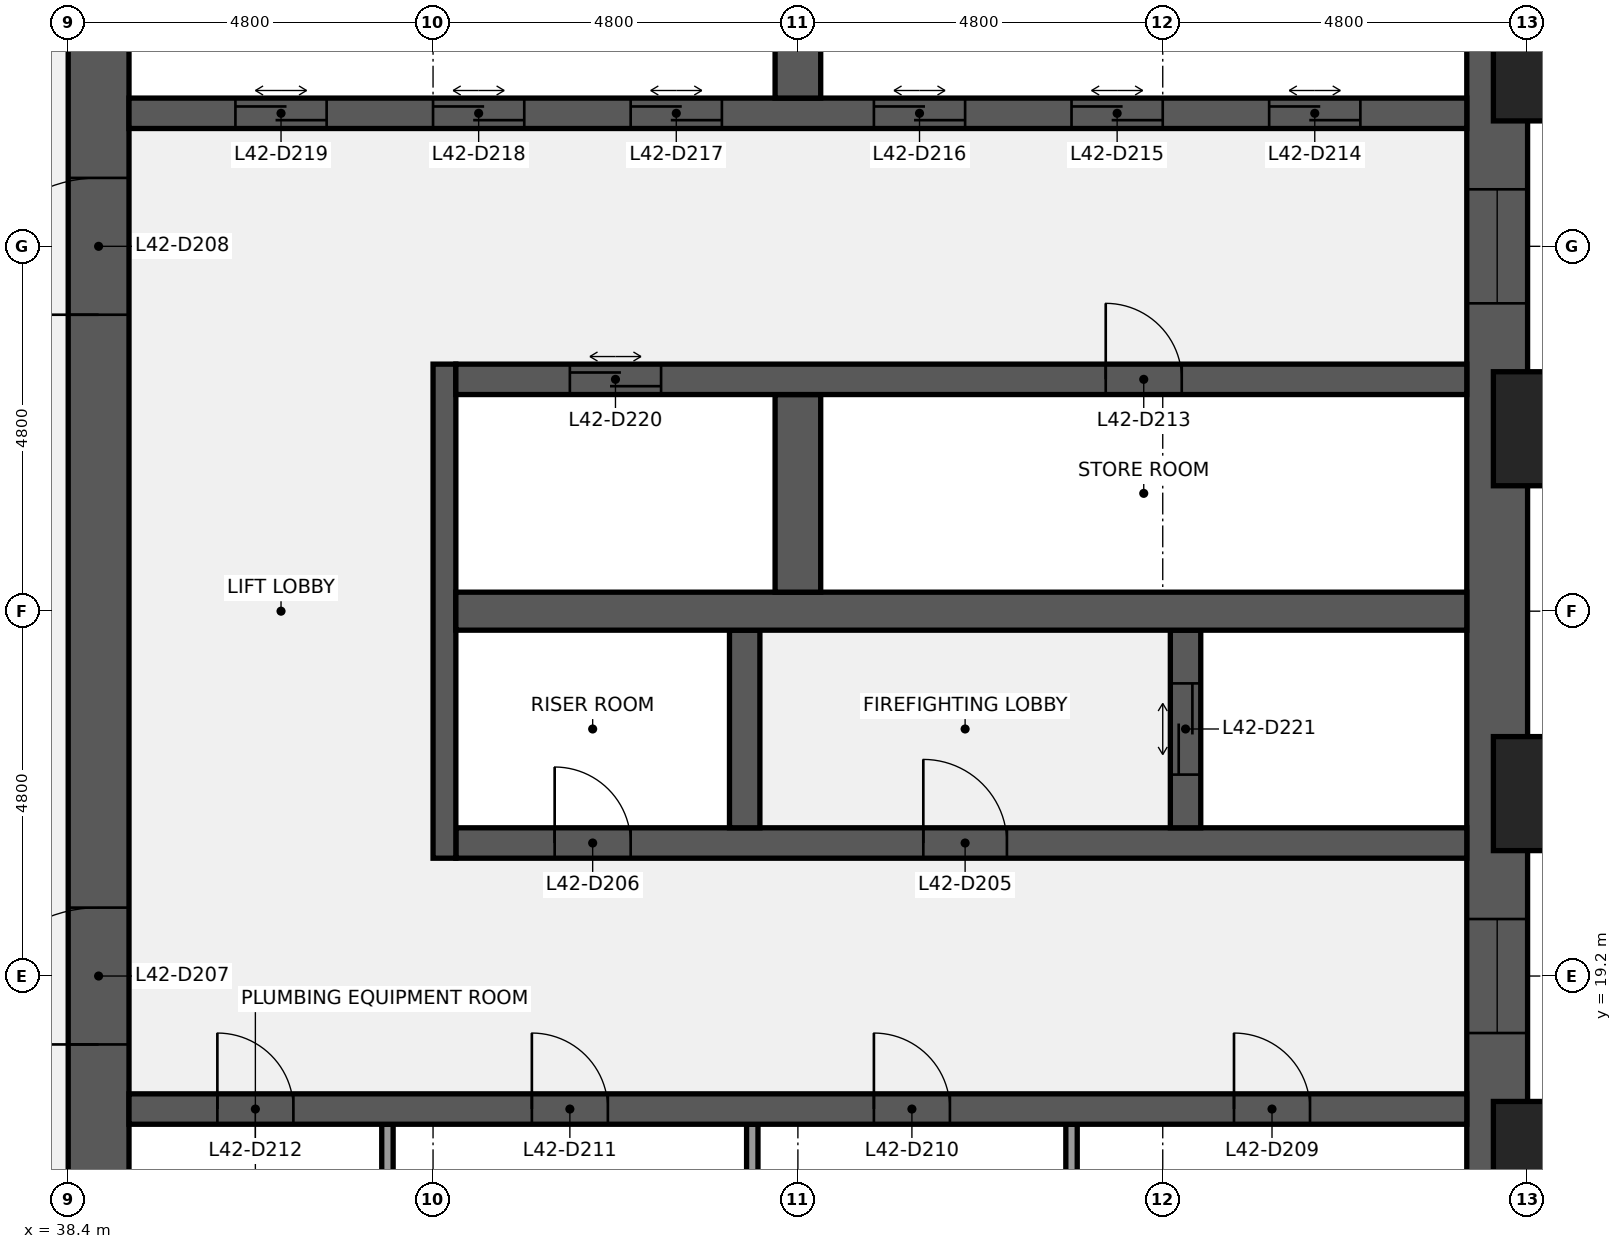
"""IFC4 building model, lengths in metres.
Left out: names, types, materials, properties, quantities, classifications, styles, units other than length and angle.
Written with IfcOpenShell. Run it as: python <this file> out.ifc"""

import sys

from ifc_helpers import new_model, si_unit, direction, frame, frame_2d, origin, origin_2d, place, context, subcontext, project, spatial, rectangle, extrude, element, fill, save


model = new_model("IFC4")
c1 = context("Model", 3, precision=1e-05, world=origin(), true_north=direction((0.0, 1.0)))
c2 = subcontext(c1, "Body", "Model", "MODEL_VIEW")
j1 = project(units=[si_unit("LENGTHUNIT", "METRE"), si_unit("PLANEANGLEUNIT", "RADIAN")], contexts=[c1])
p1 = place(None, origin())
s1 = spatial("IfcSite", under=j1, at=p1, CompositionType="ELEMENT")
p2 = place(p1, origin())
s2 = spatial("IfcBuilding", under=s1, at=p2, CompositionType="ELEMENT")
p3 = place(p2, frame((0.0, 0.0, 197.2)))
s3 = spatial("IfcBuildingStorey", under=s2, at=p3, CompositionType="ELEMENT", Elevation=197.2)
p4 = place(p3, frame((57.2, 38.4, 0.0), z_axis=(0.0, 0.0, 1.0), x_axis=(0.0, -1.0, 0.0)))
e1 = element("IfcWall", 1, at=p4, inside=s3, PredefinedType="SHEAR", context=c2, shape_type="SweptSolid", body=[
    extrude(rectangle(XDim=28.8, YDim=0.8, at=frame_2d((14.4, 0.0))), origin(), (0.0, 0.0, 1.0), 3.84),
])
p5 = place(p4, frame((18.45, 0.0, 0.9)))
e2 = element("IfcOpeningElement", 2, at=p5, cuts=e1, PredefinedType="OPENING", context=c2, shape_type="SweptSolid", body=[
    extrude(rectangle(XDim=1.5, YDim=1.5, at=frame_2d((0.75, 0.75))), frame((0.0, 0.41, 0.0), z_axis=(0.0, -1.0, 0.0), x_axis=(1.0, 0.0, 0.0)), (0.0, 0.0, 1.0), 0.82),
])
p6 = place(p4, frame((8.85, 0.0, 0.9)))
e3 = element("IfcOpeningElement", 3, at=p6, cuts=e1, PredefinedType="OPENING", context=c2, shape_type="SweptSolid", body=[
    extrude(rectangle(XDim=1.5, YDim=1.5, at=frame_2d((0.75, 0.75))), frame((0.0, 0.41, 0.0), z_axis=(0.0, -1.0, 0.0), x_axis=(1.0, 0.0, 0.0)), (0.0, 0.0, 1.0), 0.82),
])
p7 = place(p3, frame((38.8, 9.6, 0.0), z_axis=(0.0, 0.0, 1.0), x_axis=(0.0, 1.0, 0.0)))
e4 = element("IfcWall", 4, at=p7, inside=s3, PredefinedType="SHEAR", context=c2, shape_type="SweptSolid", body=[
    extrude(rectangle(XDim=28.8, YDim=0.8, at=frame_2d((14.4, 0.0))), origin(), (0.0, 0.0, 1.0), 3.84),
])
p8 = place(p7, frame((8.7, 0.0, 0.0)))
e5 = element("IfcOpeningElement", 5, at=p8, cuts=e4, PredefinedType="OPENING", context=c2, shape_type="SweptSolid", body=[
    extrude(rectangle(XDim=1.8, YDim=2.1, at=frame_2d((0.9, 1.05))), frame((0.0, 0.41, 0.0), z_axis=(0.0, -1.0, 0.0), x_axis=(1.0, 0.0, 0.0)), (0.0, 0.0, 1.0), 0.82),
])
p9 = place(p7, frame((18.3, 0.0, 0.0)))
e6 = element("IfcOpeningElement", 6, at=p9, cuts=e4, PredefinedType="OPENING", context=c2, shape_type="SweptSolid", body=[
    extrude(rectangle(XDim=1.8, YDim=2.1, at=frame_2d((0.9, 1.05))), frame((0.0, 0.41, 0.0), z_axis=(0.0, -1.0, 0.0), x_axis=(1.0, 0.0, 0.0)), (0.0, 0.0, 1.0), 0.82),
])
for number, where, z_axis, x_axis in (
    (7, (51.6, 14.65, 0.0), (0.0, 0.0, 1.0), (0.0, 1.0, 0.0)),
    (8, (47.4, 14.65, 0.0), (0.0, 0.0, 1.0), (0.0, 1.0, 0.0)),
    (9, (42.6, 14.65, 0.0), (0.0, 0.0, 1.0), (0.0, 1.0, 0.0)),
):
    element("IfcWall", number, at=place(p3, frame(where, z_axis=z_axis, x_axis=x_axis)), inside=s3, PredefinedType="PARTITIONING", context=c2, shape_type="SweptSolid", body=[
        extrude(rectangle(XDim=2.6, YDim=0.15, at=frame_2d((1.3, 0.0))), origin(), (0.0, 0.0, 1.0), 3.84),
    ])
p10 = place(p3, frame((39.2, 17.45, 0.0), z_axis=(0.0, 0.0, 1.0), x_axis=(1.0, 0.0, 0.0)))
e10 = element("IfcWall", 10, at=p10, inside=s3, PredefinedType="SHEAR", context=c2, shape_type="SweptSolid", body=[
    extrude(rectangle(XDim=17.6, YDim=0.4, at=frame_2d((8.8, 0.0))), origin(), (0.0, 0.0, 1.0), 3.84),
])
p11 = place(p10, frame((14.538, 0.0, 0.0)))
e11 = element("IfcOpeningElement", 11, at=p11, cuts=e10, PredefinedType="OPENING", context=c2, shape_type="SweptSolid", body=[
    extrude(rectangle(XDim=1.0, YDim=2.1, at=frame_2d((0.5, 1.05))), frame((0.0, 0.21, 0.0), z_axis=(0.0, -1.0, 0.0), x_axis=(1.0, 0.0, 0.0)), (0.0, 0.0, 1.0), 0.42),
])
p12 = place(p10, frame((9.8, 0.0, 0.0)))
e12 = element("IfcOpeningElement", 12, at=p12, cuts=e10, PredefinedType="OPENING", context=c2, shape_type="SweptSolid", body=[
    extrude(rectangle(XDim=1.0, YDim=2.1, at=frame_2d((0.5, 1.05))), frame((0.0, 0.21, 0.0), z_axis=(0.0, -1.0, 0.0), x_axis=(1.0, 0.0, 0.0)), (0.0, 0.0, 1.0), 0.42),
])
p13 = place(p10, frame((5.3, 0.0, 0.0)))
e13 = element("IfcOpeningElement", 13, at=p13, cuts=e10, PredefinedType="OPENING", context=c2, shape_type="SweptSolid", body=[
    extrude(rectangle(XDim=1.0, YDim=2.1, at=frame_2d((0.5, 1.05))), frame((0.0, 0.21, 0.0), z_axis=(0.0, -1.0, 0.0), x_axis=(1.0, 0.0, 0.0)), (0.0, 0.0, 1.0), 0.42),
])
p14 = place(p10, frame((1.163, 0.0, 0.0)))
e14 = element("IfcOpeningElement", 14, at=p14, cuts=e10, PredefinedType="OPENING", context=c2, shape_type="SweptSolid", body=[
    extrude(rectangle(XDim=1.0, YDim=2.1, at=frame_2d((0.5, 1.05))), frame((0.0, 0.21, 0.0), z_axis=(0.0, -1.0, 0.0), x_axis=(1.0, 0.0, 0.0)), (0.0, 0.0, 1.0), 0.42),
])
p15 = place(p3, frame((43.5, 20.95, 0.0), z_axis=(0.0, 0.0, 1.0), x_axis=(1.0, 0.0, 0.0)))
e15 = element("IfcWall", 15, at=p15, inside=s3, PredefinedType="SHEAR", context=c2, shape_type="SweptSolid", body=[
    extrude(rectangle(XDim=13.3, YDim=0.4, at=frame_2d((6.65, 0.0))), origin(), (0.0, 0.0, 1.0), 3.84),
])
p16 = place(p15, frame((6.15, 0.0, 0.0)))
e16 = element("IfcOpeningElement", 16, at=p16, cuts=e15, PredefinedType="OPENING", context=c2, shape_type="SweptSolid", body=[
    extrude(rectangle(XDim=1.1, YDim=2.1, at=frame_2d((0.55, 1.05))), frame((0.0, 0.21, 0.0), z_axis=(0.0, -1.0, 0.0), x_axis=(1.0, 0.0, 0.0)), (0.0, 0.0, 1.0), 0.42),
])
p17 = place(p15, frame((1.3, 0.0, 0.0)))
e17 = element("IfcOpeningElement", 17, at=p17, cuts=e15, PredefinedType="OPENING", context=c2, shape_type="SweptSolid", body=[
    extrude(rectangle(XDim=1.0, YDim=2.1, at=frame_2d((0.5, 1.05))), frame((0.0, 0.21, 0.0), z_axis=(0.0, -1.0, 0.0), x_axis=(1.0, 0.0, 0.0)), (0.0, 0.0, 1.0), 0.42),
])
p18 = place(p3, frame((43.35, 20.75, 0.0), z_axis=(0.0, 0.0, 1.0), x_axis=(0.0, 1.0, 0.0)))
e18 = element("IfcWall", 18, at=p18, inside=s3, PredefinedType="SHEAR", context=c2, shape_type="SweptSolid", body=[
    extrude(rectangle(XDim=6.5, YDim=0.3, at=frame_2d((3.25, 0.0))), origin(), (0.0, 0.0, 1.0), 3.84),
])
p19 = place(p3, frame((53.1, 21.15, 0.0), z_axis=(0.0, 0.0, 1.0), x_axis=(0.0, 1.0, 0.0)))
e19 = element("IfcWall", 19, at=p19, inside=s3, PredefinedType="SHEAR", context=c2, shape_type="SweptSolid", body=[
    extrude(rectangle(XDim=2.6, YDim=0.4, at=frame_2d((1.3, 0.0))), origin(), (0.0, 0.0, 1.0), 3.84),
])
p20 = place(p19, frame((0.7, 0.0, 0.0)))
e20 = element("IfcOpeningElement", 20, at=p20, cuts=e19, PredefinedType="OPENING", context=c2, shape_type="SweptSolid", body=[
    extrude(rectangle(XDim=1.2, YDim=2.1, at=frame_2d((0.6, 1.05))), frame((0.0, 0.21, 0.0), z_axis=(0.0, -1.0, 0.0), x_axis=(1.0, 0.0, 0.0)), (0.0, 0.0, 1.0), 0.42),
])
p21 = place(p3, frame((47.3, 21.15, 0.0), z_axis=(0.0, 0.0, 1.0), x_axis=(0.0, 1.0, 0.0)))
e21 = element("IfcWall", 21, at=p21, inside=s3, PredefinedType="SHEAR", context=c2, shape_type="SweptSolid", body=[
    extrude(rectangle(XDim=2.6, YDim=0.4, at=frame_2d((1.3, 0.0))), origin(), (0.0, 0.0, 1.0), 3.84),
])
p22 = place(p3, frame((43.5, 24.0, 0.0), z_axis=(0.0, 0.0, 1.0), x_axis=(1.0, 0.0, 0.0)))
e22 = element("IfcWall", 22, at=p22, inside=s3, PredefinedType="SHEAR", context=c2, shape_type="SweptSolid", body=[
    extrude(rectangle(XDim=13.3, YDim=0.5, at=frame_2d((6.65, 0.0))), origin(), (0.0, 0.0, 1.0), 3.84),
])
p23 = place(p3, frame((48.0, 24.25, 0.0), z_axis=(0.0, 0.0, 1.0), x_axis=(0.0, 1.0, 0.0)))
e23 = element("IfcWall", 23, at=p23, inside=s3, PredefinedType="SHEAR", context=c2, shape_type="SweptSolid", body=[
    extrude(rectangle(XDim=2.6, YDim=0.6, at=frame_2d((1.3, 0.0))), origin(), (0.0, 0.0, 1.0), 3.84),
])
p24 = place(p3, frame((43.5, 27.05, 0.0), z_axis=(0.0, 0.0, 1.0), x_axis=(1.0, 0.0, 0.0)))
e24 = element("IfcWall", 24, at=p24, inside=s3, PredefinedType="SHEAR", context=c2, shape_type="SweptSolid", body=[
    extrude(rectangle(XDim=13.3, YDim=0.4, at=frame_2d((6.65, 0.0))), origin(), (0.0, 0.0, 1.0), 3.84),
])
p25 = place(p24, frame((8.55, 0.0, 0.0)))
e25 = element("IfcOpeningElement", 25, at=p25, cuts=e24, PredefinedType="OPENING", context=c2, shape_type="SweptSolid", body=[
    extrude(rectangle(XDim=1.0, YDim=2.1, at=frame_2d((0.5, 1.05))), frame((0.0, 0.21, 0.0), z_axis=(0.0, -1.0, 0.0), x_axis=(1.0, 0.0, 0.0)), (0.0, 0.0, 1.0), 0.42),
])
p26 = place(p24, frame((1.5, 0.0, 0.0)))
e26 = element("IfcOpeningElement", 26, at=p26, cuts=e24, PredefinedType="OPENING", context=c2, shape_type="SweptSolid", body=[
    extrude(rectangle(XDim=1.2, YDim=2.1, at=frame_2d((0.6, 1.05))), frame((0.0, 0.21, 0.0), z_axis=(0.0, -1.0, 0.0), x_axis=(1.0, 0.0, 0.0)), (0.0, 0.0, 1.0), 0.42),
])
p27 = place(p3, frame((39.2, 30.55, 0.0), z_axis=(0.0, 0.0, 1.0), x_axis=(1.0, 0.0, 0.0)))
e27 = element("IfcWall", 27, at=p27, inside=s3, PredefinedType="SHEAR", context=c2, shape_type="SweptSolid", body=[
    extrude(rectangle(XDim=17.6, YDim=0.4, at=frame_2d((8.8, 0.0))), origin(), (0.0, 0.0, 1.0), 3.84),
])
p28 = place(p27, frame((15.0, 0.0, 0.0)))
e28 = element("IfcOpeningElement", 28, at=p28, cuts=e27, PredefinedType="OPENING", context=c2, shape_type="SweptSolid", body=[
    extrude(rectangle(XDim=1.2, YDim=2.1, at=frame_2d((0.6, 1.05))), frame((0.0, 0.21, 0.0), z_axis=(0.0, -1.0, 0.0), x_axis=(1.0, 0.0, 0.0)), (0.0, 0.0, 1.0), 0.42),
])
p29 = place(p27, frame((12.4, 0.0, 0.0)))
e29 = element("IfcOpeningElement", 29, at=p29, cuts=e27, PredefinedType="OPENING", context=c2, shape_type="SweptSolid", body=[
    extrude(rectangle(XDim=1.2, YDim=2.1, at=frame_2d((0.6, 1.05))), frame((0.0, 0.21, 0.0), z_axis=(0.0, -1.0, 0.0), x_axis=(1.0, 0.0, 0.0)), (0.0, 0.0, 1.0), 0.42),
])
p30 = place(p27, frame((9.8, 0.0, 0.0)))
e30 = element("IfcOpeningElement", 30, at=p30, cuts=e27, PredefinedType="OPENING", context=c2, shape_type="SweptSolid", body=[
    extrude(rectangle(XDim=1.2, YDim=2.1, at=frame_2d((0.6, 1.05))), frame((0.0, 0.21, 0.0), z_axis=(0.0, -1.0, 0.0), x_axis=(1.0, 0.0, 0.0)), (0.0, 0.0, 1.0), 0.42),
])
p31 = place(p27, frame((6.6, 0.0, 0.0)))
e31 = element("IfcOpeningElement", 31, at=p31, cuts=e27, PredefinedType="OPENING", context=c2, shape_type="SweptSolid", body=[
    extrude(rectangle(XDim=1.2, YDim=2.1, at=frame_2d((0.6, 1.05))), frame((0.0, 0.21, 0.0), z_axis=(0.0, -1.0, 0.0), x_axis=(1.0, 0.0, 0.0)), (0.0, 0.0, 1.0), 0.42),
])
p32 = place(p27, frame((4.0, 0.0, 0.0)))
e32 = element("IfcOpeningElement", 32, at=p32, cuts=e27, PredefinedType="OPENING", context=c2, shape_type="SweptSolid", body=[
    extrude(rectangle(XDim=1.2, YDim=2.1, at=frame_2d((0.6, 1.05))), frame((0.0, 0.21, 0.0), z_axis=(0.0, -1.0, 0.0), x_axis=(1.0, 0.0, 0.0)), (0.0, 0.0, 1.0), 0.42),
])
p33 = place(p27, frame((1.4, 0.0, 0.0)))
e33 = element("IfcOpeningElement", 33, at=p33, cuts=e27, PredefinedType="OPENING", context=c2, shape_type="SweptSolid", body=[
    extrude(rectangle(XDim=1.2, YDim=2.1, at=frame_2d((0.6, 1.05))), frame((0.0, 0.21, 0.0), z_axis=(0.0, -1.0, 0.0), x_axis=(1.0, 0.0, 0.0)), (0.0, 0.0, 1.0), 0.42),
])
p34 = place(p3, frame((48.0, 30.75, 0.0), z_axis=(0.0, 0.0, 1.0), x_axis=(0.0, 1.0, 0.0)))
e34 = element("IfcWall", 34, at=p34, inside=s3, PredefinedType="SHEAR", context=c2, shape_type="SweptSolid", body=[
    extrude(rectangle(XDim=2.6, YDim=0.6, at=frame_2d((1.3, 0.0))), origin(), (0.0, 0.0, 1.0), 3.84),
])
for number, where, z_axis, x_axis in (
    (35, (58.35, 16.8, 0.0), (0.0, 0.0, 1.0), (0.0, 1.0, 0.0)),
    (36, (58.35, 21.6, 0.0), (0.0, 0.0, 1.0), (0.0, 1.0, 0.0)),
    (37, (58.35, 26.4, 0.0), (0.0, 0.0, 1.0), (0.0, 1.0, 0.0)),
    (38, (58.35, 31.2, 0.0), (0.0, 0.0, 1.0), (0.0, 1.0, 0.0)),
):
    element("IfcColumn", number, at=place(p3, frame(where, z_axis=z_axis, x_axis=x_axis)), inside=s3, PredefinedType="PILASTER", context=c2, shape_type="SweptSolid", body=[
        extrude(rectangle(XDim=2.4, YDim=1.5, at=origin_2d()), origin(), (0.0, 0.0, 1.0), 4.0),
    ])
p35 = place(p16, origin())
e39 = element("IfcDoor", 39, at=p35, inside=s3, OperationType="SINGLE_SWING_LEFT", PredefinedType="DOOR", context=c2, shape_type="SweptSolid", body=[
    extrude(rectangle(XDim=1.1, YDim=2.1, at=frame_2d((0.55, 1.05))), frame((0.0, 0.025, 0.0), z_axis=(0.0, -1.0, 0.0), x_axis=(1.0, 0.0, 0.0)), (0.0, 0.0, 1.0), 0.05),
])
fill(e16, e39)
p36 = place(p17, origin())
e40 = element("IfcDoor", 40, at=p36, inside=s3, OperationType="SINGLE_SWING_LEFT", PredefinedType="DOOR", context=c2, shape_type="SweptSolid", body=[
    extrude(rectangle(XDim=1.0, YDim=2.1, at=frame_2d((0.5, 1.05))), frame((0.0, 0.025, 0.0), z_axis=(0.0, -1.0, 0.0), x_axis=(1.0, 0.0, 0.0)), (0.0, 0.0, 1.0), 0.05),
])
fill(e17, e40)
p37 = place(p8, origin())
e41 = element("IfcDoor", 41, at=p37, inside=s3, OperationType="DOUBLE_DOOR_SINGLE_SWING", PredefinedType="DOOR", context=c2, shape_type="SweptSolid", body=[
    extrude(rectangle(XDim=1.8, YDim=2.1, at=frame_2d((0.9, 1.05))), frame((0.0, 0.025, 0.0), z_axis=(0.0, -1.0, 0.0), x_axis=(1.0, 0.0, 0.0)), (0.0, 0.0, 1.0), 0.05),
])
fill(e5, e41)
p38 = place(p9, origin())
e42 = element("IfcDoor", 42, at=p38, inside=s3, OperationType="DOUBLE_DOOR_SINGLE_SWING", PredefinedType="DOOR", context=c2, shape_type="SweptSolid", body=[
    extrude(rectangle(XDim=1.8, YDim=2.1, at=frame_2d((0.9, 1.05))), frame((0.0, 0.025, 0.0), z_axis=(0.0, -1.0, 0.0), x_axis=(1.0, 0.0, 0.0)), (0.0, 0.0, 1.0), 0.05),
])
fill(e6, e42)
p39 = place(p11, origin())
e43 = element("IfcDoor", 43, at=p39, inside=s3, OperationType="SINGLE_SWING_LEFT", PredefinedType="DOOR", context=c2, shape_type="SweptSolid", body=[
    extrude(rectangle(XDim=1.0, YDim=2.1, at=frame_2d((0.5, 1.05))), frame((0.0, 0.025, 0.0), z_axis=(0.0, -1.0, 0.0), x_axis=(1.0, 0.0, 0.0)), (0.0, 0.0, 1.0), 0.05),
])
fill(e11, e43)
p40 = place(p12, origin())
e44 = element("IfcDoor", 44, at=p40, inside=s3, OperationType="SINGLE_SWING_LEFT", PredefinedType="DOOR", context=c2, shape_type="SweptSolid", body=[
    extrude(rectangle(XDim=1.0, YDim=2.1, at=frame_2d((0.5, 1.05))), frame((0.0, 0.025, 0.0), z_axis=(0.0, -1.0, 0.0), x_axis=(1.0, 0.0, 0.0)), (0.0, 0.0, 1.0), 0.05),
])
fill(e12, e44)
p41 = place(p13, origin())
e45 = element("IfcDoor", 45, at=p41, inside=s3, OperationType="SINGLE_SWING_LEFT", PredefinedType="DOOR", context=c2, shape_type="SweptSolid", body=[
    extrude(rectangle(XDim=1.0, YDim=2.1, at=frame_2d((0.5, 1.05))), frame((0.0, 0.025, 0.0), z_axis=(0.0, -1.0, 0.0), x_axis=(1.0, 0.0, 0.0)), (0.0, 0.0, 1.0), 0.05),
])
fill(e13, e45)
p42 = place(p14, origin())
e46 = element("IfcDoor", 46, at=p42, inside=s3, OperationType="SINGLE_SWING_LEFT", PredefinedType="DOOR", context=c2, shape_type="SweptSolid", body=[
    extrude(rectangle(XDim=1.0, YDim=2.1, at=frame_2d((0.5, 1.05))), frame((0.0, 0.025, 0.0), z_axis=(0.0, -1.0, 0.0), x_axis=(1.0, 0.0, 0.0)), (0.0, 0.0, 1.0), 0.05),
])
fill(e14, e46)
p43 = place(p25, origin())
e47 = element("IfcDoor", 47, at=p43, inside=s3, OperationType="SINGLE_SWING_LEFT", PredefinedType="DOOR", context=c2, shape_type="SweptSolid", body=[
    extrude(rectangle(XDim=1.0, YDim=2.1, at=frame_2d((0.5, 1.05))), frame((0.0, 0.025, 0.0), z_axis=(0.0, -1.0, 0.0), x_axis=(1.0, 0.0, 0.0)), (0.0, 0.0, 1.0), 0.05),
])
fill(e25, e47)
p44 = place(p28, origin())
e48 = element("IfcDoor", 48, at=p44, inside=s3, OperationType="DOUBLE_DOOR_SLIDING", PredefinedType="DOOR", context=c2, shape_type="SweptSolid", body=[
    extrude(rectangle(XDim=1.2, YDim=2.1, at=frame_2d((0.6, 1.05))), frame((0.0, 0.025, 0.0), z_axis=(0.0, -1.0, 0.0), x_axis=(1.0, 0.0, 0.0)), (0.0, 0.0, 1.0), 0.05),
])
fill(e28, e48)
p45 = place(p29, origin())
e49 = element("IfcDoor", 49, at=p45, inside=s3, OperationType="DOUBLE_DOOR_SLIDING", PredefinedType="DOOR", context=c2, shape_type="SweptSolid", body=[
    extrude(rectangle(XDim=1.2, YDim=2.1, at=frame_2d((0.6, 1.05))), frame((0.0, 0.025, 0.0), z_axis=(0.0, -1.0, 0.0), x_axis=(1.0, 0.0, 0.0)), (0.0, 0.0, 1.0), 0.05),
])
fill(e29, e49)
p46 = place(p30, origin())
e50 = element("IfcDoor", 50, at=p46, inside=s3, OperationType="DOUBLE_DOOR_SLIDING", PredefinedType="DOOR", context=c2, shape_type="SweptSolid", body=[
    extrude(rectangle(XDim=1.2, YDim=2.1, at=frame_2d((0.6, 1.05))), frame((0.0, 0.025, 0.0), z_axis=(0.0, -1.0, 0.0), x_axis=(1.0, 0.0, 0.0)), (0.0, 0.0, 1.0), 0.05),
])
fill(e30, e50)
p47 = place(p31, origin())
e51 = element("IfcDoor", 51, at=p47, inside=s3, OperationType="DOUBLE_DOOR_SLIDING", PredefinedType="DOOR", context=c2, shape_type="SweptSolid", body=[
    extrude(rectangle(XDim=1.2, YDim=2.1, at=frame_2d((0.6, 1.05))), frame((0.0, 0.025, 0.0), z_axis=(0.0, -1.0, 0.0), x_axis=(1.0, 0.0, 0.0)), (0.0, 0.0, 1.0), 0.05),
])
fill(e31, e51)
p48 = place(p32, origin())
e52 = element("IfcDoor", 52, at=p48, inside=s3, OperationType="DOUBLE_DOOR_SLIDING", PredefinedType="DOOR", context=c2, shape_type="SweptSolid", body=[
    extrude(rectangle(XDim=1.2, YDim=2.1, at=frame_2d((0.6, 1.05))), frame((0.0, 0.025, 0.0), z_axis=(0.0, -1.0, 0.0), x_axis=(1.0, 0.0, 0.0)), (0.0, 0.0, 1.0), 0.05),
])
fill(e32, e52)
p49 = place(p33, origin())
e53 = element("IfcDoor", 53, at=p49, inside=s3, OperationType="DOUBLE_DOOR_SLIDING", PredefinedType="DOOR", context=c2, shape_type="SweptSolid", body=[
    extrude(rectangle(XDim=1.2, YDim=2.1, at=frame_2d((0.6, 1.05))), frame((0.0, 0.025, 0.0), z_axis=(0.0, -1.0, 0.0), x_axis=(1.0, 0.0, 0.0)), (0.0, 0.0, 1.0), 0.05),
])
fill(e33, e53)
p50 = place(p26, origin())
e54 = element("IfcDoor", 54, at=p50, inside=s3, OperationType="DOUBLE_DOOR_SLIDING", PredefinedType="DOOR", context=c2, shape_type="SweptSolid", body=[
    extrude(rectangle(XDim=1.2, YDim=2.1, at=frame_2d((0.6, 1.05))), frame((0.0, 0.025, 0.0), z_axis=(0.0, -1.0, 0.0), x_axis=(1.0, 0.0, 0.0)), (0.0, 0.0, 1.0), 0.05),
])
fill(e26, e54)
p51 = place(p20, origin())
e55 = element("IfcDoor", 55, at=p51, inside=s3, OperationType="DOUBLE_DOOR_SLIDING", PredefinedType="DOOR", context=c2, shape_type="SweptSolid", body=[
    extrude(rectangle(XDim=1.2, YDim=2.1, at=frame_2d((0.6, 1.05))), frame((0.0, 0.025, 0.0), z_axis=(0.0, -1.0, 0.0), x_axis=(1.0, 0.0, 0.0)), (0.0, 0.0, 1.0), 0.05),
])
fill(e20, e55)
p52 = place(p5, origin())
e56 = element("IfcWindow", 56, at=p52, inside=s3, PartitioningType="SINGLE_PANEL", PredefinedType="WINDOW", context=c2, shape_type="SweptSolid", body=[
    extrude(rectangle(XDim=1.5, YDim=1.5, at=frame_2d((0.75, 0.75))), frame((0.0, 0.03, 0.0), z_axis=(0.0, -1.0, 0.0), x_axis=(1.0, 0.0, 0.0)), (0.0, 0.0, 1.0), 0.06),
])
fill(e2, e56)
p53 = place(p6, origin())
e57 = element("IfcWindow", 57, at=p53, inside=s3, PartitioningType="SINGLE_PANEL", PredefinedType="WINDOW", context=c2, shape_type="SweptSolid", body=[
    extrude(rectangle(XDim=1.5, YDim=1.5, at=frame_2d((0.75, 0.75))), frame((0.0, 0.03, 0.0), z_axis=(0.0, -1.0, 0.0), x_axis=(1.0, 0.0, 0.0)), (0.0, 0.0, 1.0), 0.06),
])
fill(e3, e57)
save(model, sys.argv[1])
